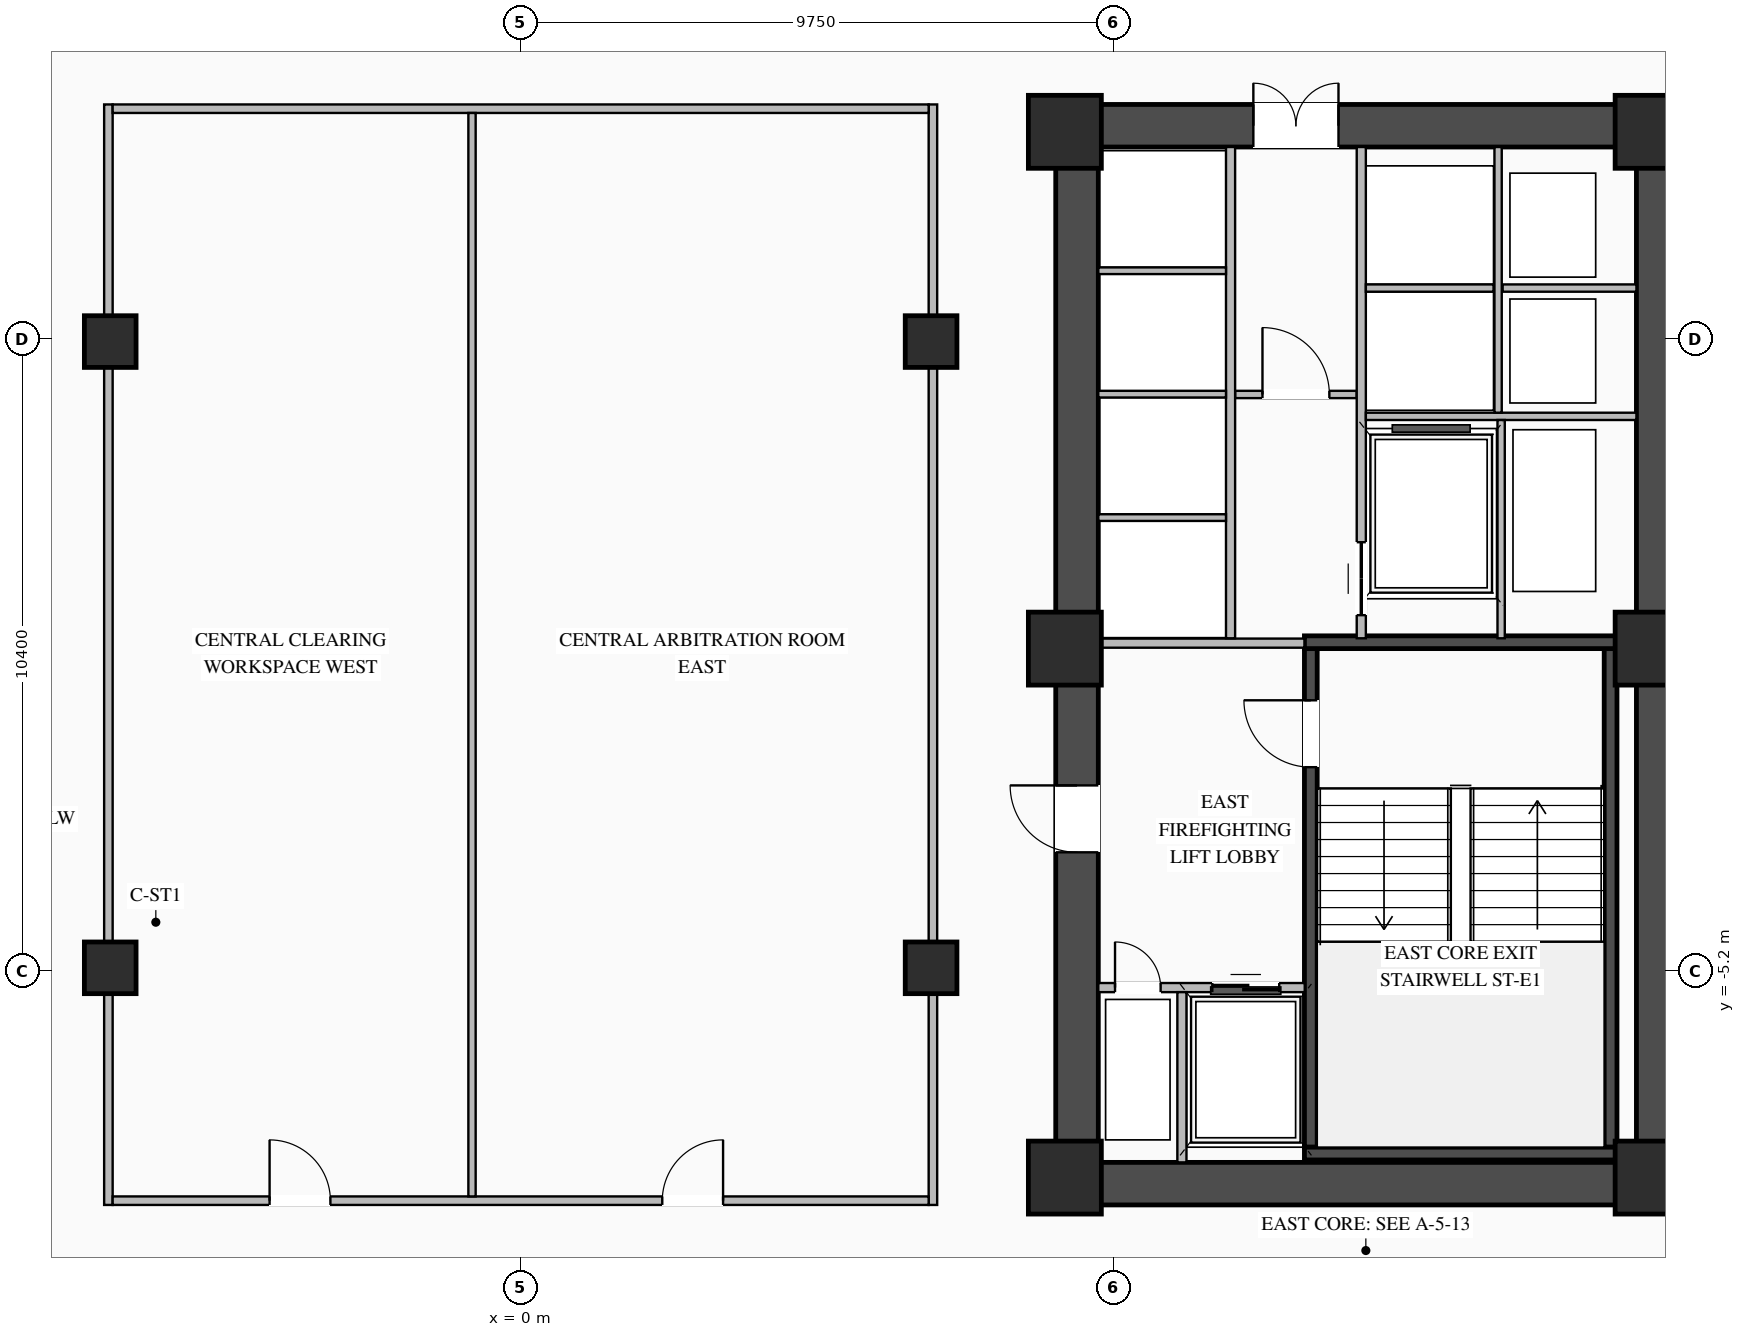
"""IFC4 building model, lengths in metres.
Left out: names, types, materials, properties, quantities, classifications, styles, units other than length and angle.
Written with IfcOpenShell. Run it as: python <this file> out.ifc"""

import sys

from ifc_helpers import new_model, si_unit, direction, frame, frame_2d, origin, origin_2d, place, context, subcontext, project, spatial, rectangle, i_section, extrude, element, fill, save


model = new_model("IFC4")
c1 = context("Model", 3, precision=1e-05, world=origin(), true_north=direction((0.0, 1.0)))
c2 = subcontext(c1, "Body", "Model", "MODEL_VIEW")
j1 = project(units=[si_unit("LENGTHUNIT", "METRE"), si_unit("PLANEANGLEUNIT", "RADIAN")], contexts=[c1])
p1 = place(None, origin())
s1 = spatial("IfcSite", under=j1, at=p1, CompositionType="ELEMENT")
p2 = place(p1, origin())
s2 = spatial("IfcBuilding", under=s1, at=p2, CompositionType="ELEMENT")
p3 = place(p2, frame((0.0, 0.0, 41.55)))
s3 = spatial("IfcBuildingStorey", under=s2, at=p3, CompositionType="ELEMENT", Elevation=41.55)
p4 = place(p3, frame((8.8, -8.7, 0.0), z_axis=(0.0, 0.0, 1.0), x_axis=(1.0, 0.0, 0.0)))
e1 = element("IfcWall", 1, at=p4, inside=s3, PredefinedType="SHEAR", context=c2, shape_type="SweptSolid", body=[
    extrude(rectangle(XDim=10.25, YDim=0.7, at=frame_2d((5.125, 0.0))), origin(), (0.0, 0.0, 1.0), 3.27),
])
p5 = place(p3, frame((8.8, 8.7, 0.0), z_axis=(0.0, 0.0, 1.0), x_axis=(1.0, 0.0, 0.0)))
e2 = element("IfcWall", 2, at=p5, inside=s3, PredefinedType="SHEAR", context=c2, shape_type="SweptSolid", body=[
    extrude(rectangle(XDim=10.25, YDim=0.7, at=frame_2d((5.125, 0.0))), origin(), (0.0, 0.0, 1.0), 3.27),
])
p6 = place(p5, frame((3.25, 0.0, 0.0)))
e3 = element("IfcOpeningElement", 3, at=p6, cuts=e2, PredefinedType="OPENING", context=c2, shape_type="SweptSolid", body=[
    extrude(rectangle(XDim=1.4, YDim=2.05, at=frame_2d((0.7, 1.025))), frame((0.0, 0.36, 0.0), z_axis=(0.0, -1.0, 0.0), x_axis=(1.0, 0.0, 0.0)), (0.0, 0.0, 1.0), 0.72),
])
p7 = place(p3, frame((9.15, -8.35, 0.0), z_axis=(0.0, 0.0, 1.0), x_axis=(0.0, 1.0, 0.0)))
e4 = element("IfcWall", 4, at=p7, inside=s3, PredefinedType="SHEAR", context=c2, shape_type="SweptSolid", body=[
    extrude(rectangle(XDim=16.7, YDim=0.7, at=frame_2d((8.35, 0.0))), origin(), (0.0, 0.0, 1.0), 3.27),
])
p8 = place(p7, frame((5.1, 0.0, 0.0)))
e5 = element("IfcOpeningElement", 5, at=p8, cuts=e4, PredefinedType="OPENING", context=c2, shape_type="SweptSolid", body=[
    extrude(rectangle(XDim=1.1, YDim=2.08, at=frame_2d((0.55, 1.04))), frame((0.0, 0.36, 0.0), z_axis=(0.0, -1.0, 0.0), x_axis=(1.0, 0.0, 0.0)), (0.0, 0.0, 1.0), 0.72),
])
p9 = place(p3, frame((18.7, -8.35, 0.0), z_axis=(0.0, 0.0, 1.0), x_axis=(0.0, 1.0, 0.0)))
e6 = element("IfcWall", 6, at=p9, inside=s3, PredefinedType="SHEAR", context=c2, shape_type="SweptSolid", body=[
    extrude(rectangle(XDim=16.7, YDim=0.7, at=frame_2d((8.35, 0.0))), origin(), (0.0, 0.0, 1.0), 3.27),
])
p10 = place(p3, frame((12.995, -8.1, 0.0), z_axis=(0.0, 0.0, 1.0), x_axis=(0.0, 1.0, 0.0)))
e7 = element("IfcWall", 7, at=p10, inside=s3, PredefinedType="SHEAR", context=c2, shape_type="SweptSolid", body=[
    extrude(rectangle(XDim=8.2, YDim=0.21, at=frame_2d((4.1, 0.0))), origin(), (0.0, 0.0, 1.0), 3.27),
])
p11 = place(p10, frame((6.25, 0.0, 0.0)))
e8 = element("IfcOpeningElement", 8, at=p11, cuts=e7, PredefinedType="OPENING", context=c2, shape_type="SweptSolid", body=[
    extrude(rectangle(XDim=1.1, YDim=2.15, at=frame_2d((0.55, 1.075))), frame((0.0, 0.115, 0.0), z_axis=(0.0, -1.0, 0.0), x_axis=(1.0, 0.0, 0.0)), (0.0, 0.0, 1.0), 0.23),
])
p12 = place(p3, frame((17.925, -8.1, 0.0), z_axis=(0.0, 0.0, 1.0), x_axis=(0.0, 1.0, 0.0)))
e9 = element("IfcWall", 9, at=p12, inside=s3, PredefinedType="SHEAR", context=c2, shape_type="SweptSolid", body=[
    extrude(rectangle(XDim=8.2, YDim=0.21, at=frame_2d((4.1, 0.0))), origin(), (0.0, 0.0, 1.0), 3.27),
])
for number, where, z_axis, x_axis in (
    (10, (12.89, -8.205, 0.0), (0.0, 0.0, 1.0), (1.0, 0.0, 0.0)),
    (11, (18.03, 0.205, 0.0), (0.0, 0.0, 1.0), (-1.0, 0.0, 0.0)),
):
    element("IfcWall", number, at=place(p3, frame(where, z_axis=z_axis, x_axis=x_axis)), inside=s3, PredefinedType="SHEAR", context=c2, shape_type="SweptSolid", body=[
        extrude(rectangle(XDim=5.14, YDim=0.21, at=frame_2d((2.57, 0.0))), origin(), (0.0, 0.0, 1.0), 3.27),
    ])
for number, where, z_axis, x_axis in (
    (12, (8.95, -8.6, 0.0), (0.0, 0.0, 1.0), (1.0, 0.0, 0.0)),
    (13, (8.95, 0.1, 0.0), (0.0, 0.0, 1.0), (1.0, 0.0, 0.0)),
    (14, (8.95, 8.6, 0.0), (0.0, 0.0, 1.0), (1.0, 0.0, 0.0)),
    (15, (18.6, -8.6, 0.0), (0.0, 0.0, 1.0), (1.0, 0.0, 0.0)),
    (16, (18.6, 0.1, 0.0), (0.0, 0.0, 1.0), (1.0, 0.0, 0.0)),
    (17, (18.6, 8.6, 0.0), (0.0, 0.0, 1.0), (1.0, 0.0, 0.0)),
):
    element("IfcColumn", number, at=place(p3, frame(where, z_axis=z_axis, x_axis=x_axis)), inside=s3, PredefinedType="COLUMN", context=c2, shape_type="SweptSolid", body=[
        extrude(rectangle(XDim=1.2, YDim=1.2, at=origin_2d()), origin(), (0.0, 0.0, 1.0), 3.45),
    ])
for number, where, z_axis, x_axis in (
    (18, (-6.75, -5.15, 0.0), (0.0, 0.0, 1.0), (1.0, 0.0, 0.0)),
    (19, (-6.75, 5.15, 0.0), (0.0, 0.0, 1.0), (1.0, 0.0, 0.0)),
    (20, (6.75, -5.15, 0.0), (0.0, 0.0, 1.0), (1.0, 0.0, 0.0)),
    (21, (6.75, 5.15, 0.0), (0.0, 0.0, 1.0), (1.0, 0.0, 0.0)),
):
    element("IfcColumn", number, at=place(p3, frame(where, z_axis=z_axis, x_axis=x_axis)), inside=s3, PredefinedType="COLUMN", context=c2, shape_type="SweptSolid", body=[
        extrude(i_section(OverallWidth=0.85, OverallDepth=0.85, WebThickness=0.032, FlangeThickness=0.048, at=origin_2d()), origin(), (0.0, 0.0, 1.0), 3.45),
    ])
p13 = place(p3, frame((9.5, -5.475, 0.0), z_axis=(0.0, 0.0, 1.0), x_axis=(1.0, 0.0, 0.0)))
e22 = element("IfcWall", 22, at=p13, inside=s3, PredefinedType="STANDARD", context=c2, shape_type="SweptSolid", body=[
    extrude(rectangle(XDim=3.395, YDim=0.15, at=frame_2d((1.698, 0.0))), origin(), (0.0, 0.0, 1.0), 3.25),
])
p14 = place(p13, frame((1.875, 0.0, 0.0)))
e23 = element("IfcOpeningElement", 23, at=p14, cuts=e22, PredefinedType="OPENING", context=c2, shape_type="SweptSolid", body=[
    extrude(rectangle(XDim=1.1, YDim=2.15, at=frame_2d((0.55, 1.075))), frame((0.0, 0.085, 0.0), z_axis=(0.0, -1.0, 0.0), x_axis=(1.0, 0.0, 0.0)), (0.0, 0.0, 1.0), 0.17),
])
p15 = place(p13, frame((0.275, 0.0, 0.0)))
e24 = element("IfcOpeningElement", 24, at=p15, cuts=e22, PredefinedType="OPENING", context=c2, shape_type="SweptSolid", body=[
    extrude(rectangle(XDim=0.75, YDim=2.05, at=frame_2d((0.375, 1.025))), frame((0.0, 0.085, 0.0), z_axis=(0.0, -1.0, 0.0), x_axis=(1.0, 0.0, 0.0)), (0.0, 0.0, 1.0), 0.17),
])
p16 = place(p3, frame((10.875, -8.35, 0.0), z_axis=(0.0, 0.0, 1.0), x_axis=(0.0, 1.0, 0.0)))
e25 = element("IfcWall", 25, at=p16, inside=s3, PredefinedType="STANDARD", context=c2, shape_type="SweptSolid", body=[
    extrude(rectangle(XDim=2.8, YDim=0.15, at=frame_2d((1.4, 0.0))), origin(), (0.0, 0.0, 1.0), 3.25),
])
p17 = place(p3, frame((9.5, 0.19, 0.0), z_axis=(0.0, 0.0, 1.0), x_axis=(1.0, 0.0, 0.0)))
e26 = element("IfcWall", 26, at=p17, inside=s3, PredefinedType="STANDARD", context=c2, shape_type="SweptSolid", body=[
    extrude(rectangle(XDim=3.39, YDim=0.15, at=frame_2d((1.695, 0.0))), origin(), (0.0, 0.0, 1.0), 2.645),
])
p18 = place(p3, frame((11.75, 4.28, 0.0), z_axis=(0.0, 0.0, 1.0), x_axis=(1.0, 0.0, 0.0)))
e27 = element("IfcWall", 27, at=p18, inside=s3, PredefinedType="STANDARD", context=c2, shape_type="SweptSolid", body=[
    extrude(rectangle(XDim=2.0, YDim=0.12, at=frame_2d((1.0, 0.0))), origin(), (0.0, 0.0, 1.0), 3.25),
])
p19 = place(p18, frame((0.45, 0.0, 0.0)))
e28 = element("IfcOpeningElement", 28, at=p19, cuts=e27, PredefinedType="OPENING", context=c2, shape_type="SweptSolid", body=[
    extrude(rectangle(XDim=1.1, YDim=2.1, at=frame_2d((0.55, 1.05))), frame((0.0, 0.07, 0.0), z_axis=(0.0, -1.0, 0.0), x_axis=(1.0, 0.0, 0.0)), (0.0, 0.0, 1.0), 0.14),
])
p20 = place(p3, frame((11.675, 0.27, 0.0), z_axis=(0.0, 0.0, 1.0), x_axis=(0.0, 1.0, 0.0)))
e29 = element("IfcWall", 29, at=p20, inside=s3, PredefinedType="STANDARD", context=c2, shape_type="SweptSolid", body=[
    extrude(rectangle(XDim=8.08, YDim=0.15, at=frame_2d((4.04, 0.0))), origin(), (0.0, 0.0, 1.0), 3.25),
])
for number, where, z_axis, x_axis in (
    (30, (9.5, 2.255, 0.0), (0.0, 0.0, 1.0), (1.0, 0.0, 0.0)),
    (31, (9.5, 4.285, 0.0), (0.0, 0.0, 1.0), (1.0, 0.0, 0.0)),
    (32, (9.5, 6.315, 0.0), (0.0, 0.0, 1.0), (1.0, 0.0, 0.0)),
):
    element("IfcWall", number, at=place(p3, frame(where, z_axis=z_axis, x_axis=x_axis)), inside=s3, PredefinedType="STANDARD", context=c2, shape_type="SweptSolid", body=[
        extrude(rectangle(XDim=2.1, YDim=0.11, at=frame_2d((1.05, 0.0))), origin(), (0.0, 0.0, 1.0), 3.25),
    ])
p21 = place(p3, frame((13.825, 0.27, 0.0), z_axis=(0.0, 0.0, 1.0), x_axis=(0.0, 1.0, 0.0)))
e33 = element("IfcWall", 33, at=p21, inside=s3, PredefinedType="STANDARD", context=c2, shape_type="SweptSolid", body=[
    extrude(rectangle(XDim=8.08, YDim=0.15, at=frame_2d((4.04, 0.0))), origin(), (0.0, 0.0, 1.0), 3.25),
])
p22 = place(p21, frame((0.38, 0.0, 0.0)))
e34 = element("IfcOpeningElement", 34, at=p22, cuts=e33, PredefinedType="OPENING", context=c2, shape_type="SweptSolid", body=[
    extrude(rectangle(XDim=1.2, YDim=2.1, at=frame_2d((0.6, 1.05))), frame((0.0, 0.085, 0.0), z_axis=(0.0, -1.0, 0.0), x_axis=(1.0, 0.0, 0.0)), (0.0, 0.0, 1.0), 0.17),
])
p23 = place(p3, frame((13.9, 3.92, 0.0), z_axis=(0.0, 0.0, 1.0), x_axis=(1.0, 0.0, 0.0)))
e35 = element("IfcWall", 35, at=p23, inside=s3, PredefinedType="STANDARD", context=c2, shape_type="SweptSolid", body=[
    extrude(rectangle(XDim=4.45, YDim=0.12, at=frame_2d((2.225, 0.0))), origin(), (0.0, 0.0, 1.0), 3.25),
])
p24 = place(p3, frame((16.15, 6.03, 0.0), z_axis=(0.0, 0.0, 1.0), x_axis=(1.0, 0.0, 0.0)))
e36 = element("IfcWall", 36, at=p24, inside=s3, PredefinedType="STANDARD", context=c2, shape_type="SweptSolid", body=[
    extrude(rectangle(XDim=2.2, YDim=0.12, at=frame_2d((1.1, 0.0))), origin(), (0.0, 0.0, 1.0), 3.25),
])
p25 = place(p3, frame((16.075, 3.98, 0.0), z_axis=(0.0, 0.0, 1.0), x_axis=(0.0, 1.0, 0.0)))
e37 = element("IfcWall", 37, at=p25, inside=s3, PredefinedType="STANDARD", context=c2, shape_type="SweptSolid", body=[
    extrude(rectangle(XDim=4.37, YDim=0.12, at=frame_2d((2.185, 0.0))), origin(), (0.0, 0.0, 1.0), 3.25),
])
p26 = place(p3, frame((13.9, 6.03, 0.0), z_axis=(0.0, 0.0, 1.0), x_axis=(1.0, 0.0, 0.0)))
e38 = element("IfcWall", 38, at=p26, inside=s3, PredefinedType="STANDARD", context=c2, shape_type="SweptSolid", body=[
    extrude(rectangle(XDim=2.1, YDim=0.12, at=frame_2d((1.05, 0.0))), origin(), (0.0, 0.0, 1.0), 3.25),
])
p27 = place(p3, frame((16.125, 0.27, 0.0), z_axis=(0.0, 0.0, 1.0), x_axis=(0.0, 1.0, 0.0)))
e39 = element("IfcWall", 39, at=p27, inside=s3, PredefinedType="STANDARD", context=c2, shape_type="SweptSolid", body=[
    extrude(rectangle(XDim=3.59, YDim=0.12, at=frame_2d((1.795, 0.0))), origin(), (0.0, 0.0, 1.0), 3.25),
])
for number, where, z_axis, x_axis in (
    (40, (-6.78, -9.05, 0.0), (0.0, 0.0, 1.0), (0.0, 1.0, 0.0)),
    (41, (6.78, -9.05, 0.0), (0.0, 0.0, 1.0), (0.0, 1.0, 0.0)),
):
    element("IfcWall", number, at=place(p3, frame(where, z_axis=z_axis, x_axis=x_axis)), inside=s3, PredefinedType="STANDARD", context=c2, shape_type="SweptSolid", body=[
        extrude(rectangle(XDim=18.1, YDim=0.14, at=frame_2d((9.05, 0.0))), origin(), (0.0, 0.0, 1.0), 2.645),
    ])
p28 = place(p3, frame((-6.71, -8.98, 0.0), z_axis=(0.0, 0.0, 1.0), x_axis=(1.0, 0.0, 0.0)))
e42 = element("IfcWall", 42, at=p28, inside=s3, PredefinedType="STANDARD", context=c2, shape_type="SweptSolid", body=[
    extrude(rectangle(XDim=13.42, YDim=0.14, at=frame_2d((6.71, 0.0))), origin(), (0.0, 0.0, 1.0), 3.25),
])
p29 = place(p28, frame((2.581, 0.0, 0.0)))
e43 = element("IfcOpeningElement", 43, at=p29, cuts=e42, PredefinedType="OPENING", context=c2, shape_type="SweptSolid", body=[
    extrude(rectangle(XDim=1.0, YDim=2.08, at=frame_2d((0.5, 1.04))), frame((0.0, 0.08, 0.0), z_axis=(0.0, -1.0, 0.0), x_axis=(1.0, 0.0, 0.0)), (0.0, 0.0, 1.0), 0.16),
])
p30 = place(p28, frame((9.039, 0.0, 0.0)))
e44 = element("IfcOpeningElement", 44, at=p30, cuts=e42, PredefinedType="OPENING", context=c2, shape_type="SweptSolid", body=[
    extrude(rectangle(XDim=1.0, YDim=2.08, at=frame_2d((0.5, 1.04))), frame((0.0, 0.08, 0.0), z_axis=(0.0, -1.0, 0.0), x_axis=(1.0, 0.0, 0.0)), (0.0, 0.0, 1.0), 0.16),
])
p31 = place(p3, frame((-6.71, 8.98, 0.0), z_axis=(0.0, 0.0, 1.0), x_axis=(1.0, 0.0, 0.0)))
e45 = element("IfcWall", 45, at=p31, inside=s3, PredefinedType="STANDARD", context=c2, shape_type="SweptSolid", body=[
    extrude(rectangle(XDim=13.42, YDim=0.14, at=frame_2d((6.71, 0.0))), origin(), (0.0, 0.0, 1.0), 3.25),
])
p32 = place(p3, frame((-0.8, -8.91, 0.0), z_axis=(0.0, 0.0, 1.0), x_axis=(0.0, 1.0, 0.0)))
e46 = element("IfcWall", 46, at=p32, inside=s3, PredefinedType="STANDARD", context=c2, shape_type="SweptSolid", body=[
    extrude(rectangle(XDim=17.82, YDim=0.12, at=frame_2d((8.91, 0.0))), origin(), (0.0, 0.0, 1.0), 3.25),
])
p33 = place(p11, origin())
e47 = element("IfcDoor", 47, at=p33, inside=s3, OperationType="SINGLE_SWING_RIGHT", PredefinedType="DOOR", context=c2, shape_type="SweptSolid", body=[
    extrude(rectangle(XDim=1.1, YDim=2.15, at=frame_2d((0.55, 1.075))), frame((0.0, 0.025, 0.0), z_axis=(0.0, -1.0, 0.0), x_axis=(1.0, 0.0, 0.0)), (0.0, 0.0, 1.0), 0.05),
])
fill(e8, e47)
p34 = place(p14, origin())
e48 = element("IfcDoor", 48, at=p34, inside=s3, OperationType="DOUBLE_DOOR_SLIDING", PredefinedType="DOOR", context=c2, shape_type="SweptSolid", body=[
    extrude(rectangle(XDim=1.1, YDim=2.15, at=frame_2d((0.55, 1.075))), frame((0.0, 0.025, 0.0), z_axis=(0.0, -1.0, 0.0), x_axis=(1.0, 0.0, 0.0)), (0.0, 0.0, 1.0), 0.05),
])
fill(e23, e48)
p35 = place(p15, origin())
e49 = element("IfcDoor", 49, at=p35, inside=s3, OperationType="SINGLE_SWING_LEFT", PredefinedType="DOOR", context=c2, shape_type="SweptSolid", body=[
    extrude(rectangle(XDim=0.75, YDim=2.05, at=frame_2d((0.375, 1.025))), frame((0.0, 0.025, 0.0), z_axis=(0.0, -1.0, 0.0), x_axis=(1.0, 0.0, 0.0)), (0.0, 0.0, 1.0), 0.05),
])
fill(e24, e49)
p36 = place(p8, origin())
e50 = element("IfcDoor", 50, at=p36, inside=s3, OperationType="SINGLE_SWING_RIGHT", PredefinedType="DOOR", context=c2, shape_type="SweptSolid", body=[
    extrude(rectangle(XDim=1.1, YDim=2.08, at=frame_2d((0.55, 1.04))), frame((0.0, -0.255, 0.0), z_axis=(0.0, -1.0, 0.0), x_axis=(1.0, 0.0, 0.0)), (0.0, 0.0, 1.0), 0.05),
])
fill(e5, e50)
p37 = place(p19, origin())
e51 = element("IfcDoor", 51, at=p37, inside=s3, OperationType="SINGLE_SWING_LEFT", PredefinedType="DOOR", context=c2, shape_type="SweptSolid", body=[
    extrude(rectangle(XDim=1.1, YDim=2.1, at=frame_2d((0.55, 1.05))), frame((0.0, 0.025, 0.0), z_axis=(0.0, -1.0, 0.0), x_axis=(1.0, 0.0, 0.0)), (0.0, 0.0, 1.0), 0.05),
])
fill(e28, e51)
p38 = place(p6, origin())
e52 = element("IfcDoor", 52, at=p38, inside=s3, OperationType="DOUBLE_DOOR_SINGLE_SWING", PredefinedType="DOOR", context=c2, shape_type="SweptSolid", body=[
    extrude(rectangle(XDim=1.4, YDim=2.05, at=frame_2d((0.7, 1.025))), frame((0.0, 0.295, 0.0), z_axis=(0.0, -1.0, 0.0), x_axis=(1.0, 0.0, 0.0)), (0.0, 0.0, 1.0), 0.05),
])
fill(e3, e52)
p39 = place(p22, origin())
e53 = element("IfcDoor", 53, at=p39, inside=s3, OperationType="DOUBLE_DOOR_SLIDING", PredefinedType="DOOR", context=c2, shape_type="SweptSolid", body=[
    extrude(rectangle(XDim=1.2, YDim=2.1, at=frame_2d((0.6, 1.05))), frame((0.0, 0.025, 0.0), z_axis=(0.0, -1.0, 0.0), x_axis=(1.0, 0.0, 0.0)), (0.0, 0.0, 1.0), 0.05),
])
fill(e34, e53)
p40 = place(p29, origin())
e54 = element("IfcDoor", 54, at=p40, inside=s3, OperationType="SINGLE_SWING_LEFT", PredefinedType="DOOR", context=c2, shape_type="SweptSolid", body=[
    extrude(rectangle(XDim=1.0, YDim=2.08, at=frame_2d((0.5, 1.04))), frame((0.0, 0.025, 0.0), z_axis=(0.0, -1.0, 0.0), x_axis=(1.0, 0.0, 0.0)), (0.0, 0.0, 1.0), 0.05),
])
fill(e43, e54)
p41 = place(p30, origin())
e55 = element("IfcDoor", 55, at=p41, inside=s3, OperationType="SINGLE_SWING_RIGHT", PredefinedType="DOOR", context=c2, shape_type="SweptSolid", body=[
    extrude(rectangle(XDim=1.0, YDim=2.08, at=frame_2d((0.5, 1.04))), frame((0.0, 0.025, 0.0), z_axis=(0.0, -1.0, 0.0), x_axis=(1.0, 0.0, 0.0)), (0.0, 0.0, 1.0), 0.05),
])
fill(e44, e55)
save(model, sys.argv[1])
